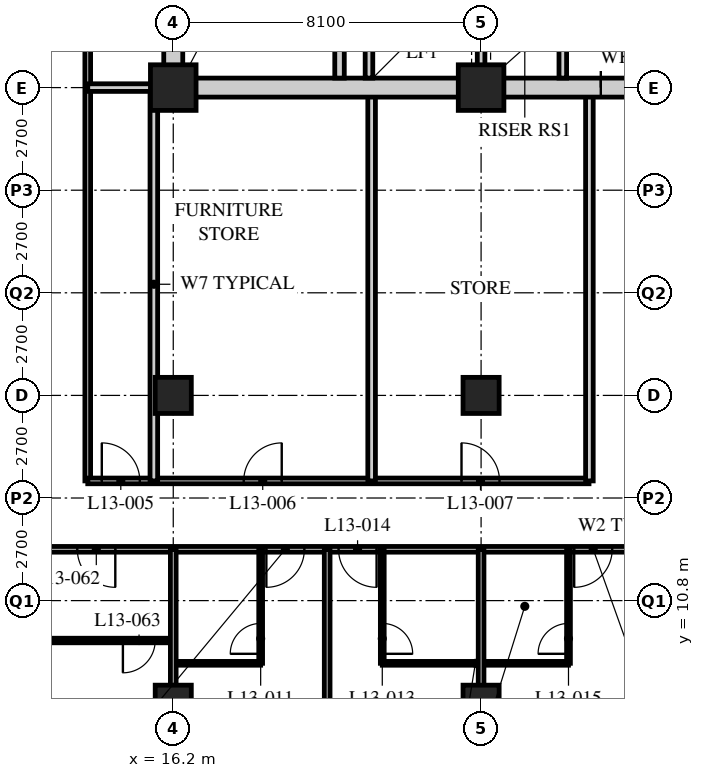
"""IFC4 building model, lengths in metres.
Left out: names, types, materials, properties, quantities, classifications, styles, units other than length and angle.
Written with IfcOpenShell. Run it as: python <this file> out.ifc"""

import sys

from ifc_helpers import new_model, si_unit, direction, frame, frame_2d, origin, origin_2d, place, context, subcontext, project, spatial, rectangle, hollow_rectangle, extrude, element, fill, save


model = new_model("IFC4")
c1 = context("Model", 3, precision=1e-05, world=origin(), true_north=direction((0.0, 1.0)))
c2 = subcontext(c1, "Body", "Model", "MODEL_VIEW")
j1 = project(units=[si_unit("LENGTHUNIT", "METRE"), si_unit("PLANEANGLEUNIT", "RADIAN")], contexts=[c1])
p1 = place(None, origin())
s1 = spatial("IfcSite", under=j1, at=p1, CompositionType="ELEMENT")
p2 = place(p1, origin())
s2 = spatial("IfcBuilding", under=s1, at=p2, CompositionType="ELEMENT")
p3 = place(p2, frame((0.0, 0.0, 56.8)))
s3 = spatial("IfcBuildingStorey", under=s2, at=p3, CompositionType="ELEMENT", Elevation=56.8)
for number, where, z_axis, x_axis in (
    (1, (16.2, 8.1, 0.0), (0.0, 0.0, 1.0), (1.0, 0.0, 0.0)),
    (2, (16.2, 16.2, 0.0), (0.0, 0.0, 1.0), (1.0, 0.0, 0.0)),
):
    element("IfcColumn", number, at=place(p3, frame(where, z_axis=z_axis, x_axis=x_axis)), inside=s3, PredefinedType="COLUMN", context=c2, shape_type="SweptSolid", body=[
        extrude(hollow_rectangle(XDim=0.95, YDim=0.95, WallThickness=0.095, at=origin_2d()), origin(), (0.0, 0.0, 1.0), 3.4),
    ])
p4 = place(p3, frame((16.2, 24.3, 0.0), z_axis=(0.0, 0.0, 1.0), x_axis=(1.0, 0.0, 0.0)))
e3 = element("IfcColumn", 3, at=p4, inside=s3, PredefinedType="COLUMN", context=c2, shape_type="SweptSolid", body=[
    extrude(hollow_rectangle(XDim=1.2, YDim=1.2, WallThickness=0.12, at=origin_2d()), origin(), (0.0, 0.0, 1.0), 3.4),
])
for number, where, z_axis, x_axis in (
    (4, (24.3, 8.1, 0.0), (0.0, 0.0, 1.0), (1.0, 0.0, 0.0)),
    (5, (24.3, 16.2, 0.0), (0.0, 0.0, 1.0), (1.0, 0.0, 0.0)),
):
    element("IfcColumn", number, at=place(p3, frame(where, z_axis=z_axis, x_axis=x_axis)), inside=s3, PredefinedType="COLUMN", context=c2, shape_type="SweptSolid", body=[
        extrude(hollow_rectangle(XDim=0.95, YDim=0.95, WallThickness=0.095, at=origin_2d()), origin(), (0.0, 0.0, 1.0), 3.4),
    ])
p5 = place(p3, frame((24.3, 24.3, 0.0), z_axis=(0.0, 0.0, 1.0), x_axis=(1.0, 0.0, 0.0)))
e6 = element("IfcColumn", 6, at=p5, inside=s3, PredefinedType="COLUMN", context=c2, shape_type="SweptSolid", body=[
    extrude(hollow_rectangle(XDim=1.2, YDim=1.2, WallThickness=0.12, at=origin_2d()), origin(), (0.0, 0.0, 1.0), 3.4),
])
p6 = place(p3, frame((12.15, 12.15, 0.0), z_axis=(0.0, 0.0, 1.0), x_axis=(1.0, 0.0, 0.0)))
e7 = element("IfcWall", 7, at=p6, inside=s3, PredefinedType="PARTITIONING", context=c2, shape_type="SweptSolid", body=[
    extrude(rectangle(XDim=32.4, YDim=0.15, at=frame_2d((16.2, 0.0))), origin(), (0.0, 0.0, 1.0), 3.19),
])
p7 = place(p6, frame((6.5, 0.0, 0.0)))
e8 = element("IfcOpeningElement", 8, at=p7, cuts=e7, PredefinedType="OPENING", context=c2, shape_type="SweptSolid", body=[
    extrude(rectangle(XDim=1.0, YDim=2.1, at=frame_2d((0.5, 1.05))), frame((0.0, 0.085, 0.0), z_axis=(0.0, -1.0, 0.0), x_axis=(1.0, 0.0, 0.0)), (0.0, 0.0, 1.0), 0.17),
])
p8 = place(p6, frame((8.4, 0.0, 0.0)))
e9 = element("IfcOpeningElement", 9, at=p8, cuts=e7, PredefinedType="OPENING", context=c2, shape_type="SweptSolid", body=[
    extrude(rectangle(XDim=1.0, YDim=2.1, at=frame_2d((0.5, 1.05))), frame((0.0, 0.085, 0.0), z_axis=(0.0, -1.0, 0.0), x_axis=(1.0, 0.0, 0.0)), (0.0, 0.0, 1.0), 0.17),
])
p9 = place(p6, frame((14.6, 0.0, 0.0)))
e10 = element("IfcOpeningElement", 10, at=p9, cuts=e7, PredefinedType="OPENING", context=c2, shape_type="SweptSolid", body=[
    extrude(rectangle(XDim=1.0, YDim=2.1, at=frame_2d((0.5, 1.05))), frame((0.0, 0.085, 0.0), z_axis=(0.0, -1.0, 0.0), x_axis=(1.0, 0.0, 0.0)), (0.0, 0.0, 1.0), 0.17),
])
p10 = place(p6, frame((18.65, 0.0, 0.0)))
e11 = element("IfcOpeningElement", 11, at=p10, cuts=e7, PredefinedType="OPENING", context=c2, shape_type="SweptSolid", body=[
    extrude(rectangle(XDim=1.0, YDim=2.1, at=frame_2d((0.5, 1.05))), frame((0.0, 0.085, 0.0), z_axis=(0.0, -1.0, 0.0), x_axis=(1.0, 0.0, 0.0)), (0.0, 0.0, 1.0), 0.17),
])
p11 = place(p6, frame((20.55, 0.0, 0.0)))
e12 = element("IfcOpeningElement", 12, at=p11, cuts=e7, PredefinedType="OPENING", context=c2, shape_type="SweptSolid", body=[
    extrude(rectangle(XDim=1.0, YDim=2.1, at=frame_2d((0.5, 1.05))), frame((0.0, 0.085, 0.0), z_axis=(0.0, -1.0, 0.0), x_axis=(1.0, 0.0, 0.0)), (0.0, 0.0, 1.0), 0.17),
])
p12 = place(p6, frame((26.75, 0.0, 0.0)))
e13 = element("IfcOpeningElement", 13, at=p12, cuts=e7, PredefinedType="OPENING", context=c2, shape_type="SweptSolid", body=[
    extrude(rectangle(XDim=1.0, YDim=2.1, at=frame_2d((0.5, 1.05))), frame((0.0, 0.085, 0.0), z_axis=(0.0, -1.0, 0.0), x_axis=(1.0, 0.0, 0.0)), (0.0, 0.0, 1.0), 0.17),
])
p13 = place(p6, frame((1.525, 0.0, 0.0)))
e14 = element("IfcOpeningElement", 14, at=p13, cuts=e7, PredefinedType="OPENING", context=c2, shape_type="SweptSolid", body=[
    extrude(rectangle(XDim=1.0, YDim=2.1, at=frame_2d((0.5, 1.05))), frame((0.0, 0.085, 0.0), z_axis=(0.0, -1.0, 0.0), x_axis=(1.0, 0.0, 0.0)), (0.0, 0.0, 1.0), 0.17),
])
p14 = place(p6, frame((29.875, 0.0, 0.0)))
e15 = element("IfcOpeningElement", 15, at=p14, cuts=e7, PredefinedType="OPENING", context=c2, shape_type="SweptSolid", body=[
    extrude(rectangle(XDim=1.0, YDim=2.1, at=frame_2d((0.5, 1.05))), frame((0.0, 0.085, 0.0), z_axis=(0.0, -1.0, 0.0), x_axis=(1.0, 0.0, 0.0)), (0.0, 0.0, 1.0), 0.17),
])
p15 = place(p3, frame((13.95, 40.5, 0.0), z_axis=(0.0, 0.0, 1.0), x_axis=(0.0, -1.0, 0.0)))
e16 = element("IfcWall", 16, at=p15, inside=s3, PredefinedType="PARTITIONING", context=c2, shape_type="SweptSolid", body=[
    extrude(rectangle(XDim=26.55, YDim=0.15, at=frame_2d((13.275, 0.0))), origin(), (0.0, 0.0, 1.0), 3.19),
])
p16 = place(p15, frame((11.65, 0.0, 0.0)))
e17 = element("IfcOpeningElement", 17, at=p16, cuts=e16, PredefinedType="OPENING", context=c2, shape_type="SweptSolid", body=[
    extrude(rectangle(XDim=1.0, YDim=2.1, at=frame_2d((0.5, 1.05))), frame((0.0, 0.085, 0.0), z_axis=(0.0, -1.0, 0.0), x_axis=(1.0, 0.0, 0.0)), (0.0, 0.0, 1.0), 0.17),
])
p17 = place(p15, frame((3.55, 0.0, 0.0)))
e18 = element("IfcOpeningElement", 18, at=p17, cuts=e16, PredefinedType="OPENING", context=c2, shape_type="SweptSolid", body=[
    extrude(rectangle(XDim=1.0, YDim=2.1, at=frame_2d((0.5, 1.05))), frame((0.0, 0.085, 0.0), z_axis=(0.0, -1.0, 0.0), x_axis=(1.0, 0.0, 0.0)), (0.0, 0.0, 1.0), 0.17),
])
p18 = place(p3, frame((13.95, 13.95, 0.0), z_axis=(0.0, 0.0, 1.0), x_axis=(1.0, 0.0, 0.0)))
e19 = element("IfcWall", 19, at=p18, inside=s3, PredefinedType="PARTITIONING", context=c2, shape_type="SweptSolid", body=[
    extrude(rectangle(XDim=13.19, YDim=0.15, at=frame_2d((6.595, 0.0))), origin(), (0.0, 0.0, 1.0), 3.19),
])
p19 = place(p18, frame((0.37, 0.0, 0.0)))
e20 = element("IfcOpeningElement", 20, at=p19, cuts=e19, PredefinedType="OPENING", context=c2, shape_type="SweptSolid", body=[
    extrude(rectangle(XDim=1.0, YDim=2.1, at=frame_2d((0.5, 1.05))), frame((0.0, 0.085, 0.0), z_axis=(0.0, -1.0, 0.0), x_axis=(1.0, 0.0, 0.0)), (0.0, 0.0, 1.0), 0.17),
])
p20 = place(p18, frame((4.104, 0.0, 0.0)))
e21 = element("IfcOpeningElement", 21, at=p20, cuts=e19, PredefinedType="OPENING", context=c2, shape_type="SweptSolid", body=[
    extrude(rectangle(XDim=1.0, YDim=2.1, at=frame_2d((0.5, 1.05))), frame((0.0, 0.085, 0.0), z_axis=(0.0, -1.0, 0.0), x_axis=(1.0, 0.0, 0.0)), (0.0, 0.0, 1.0), 0.17),
])
p21 = place(p18, frame((9.835, 0.0, 0.0)))
e22 = element("IfcOpeningElement", 22, at=p21, cuts=e19, PredefinedType="OPENING", context=c2, shape_type="SweptSolid", body=[
    extrude(rectangle(XDim=1.0, YDim=2.1, at=frame_2d((0.5, 1.05))), frame((0.0, 0.085, 0.0), z_axis=(0.0, -1.0, 0.0), x_axis=(1.0, 0.0, 0.0)), (0.0, 0.0, 1.0), 0.17),
])
for number, where, z_axis, x_axis in (
    (23, (15.689, 13.95, 0.0), (0.0, 0.0, 1.0), (0.0, 1.0, 0.0)),
    (24, (21.42, 13.95, 0.0), (0.0, 0.0, 1.0), (0.0, 1.0, 0.0)),
    (25, (27.15, 13.95, 0.0), (0.0, 0.0, 1.0), (0.0, 1.0, 0.0)),
):
    element("IfcWall", number, at=place(p3, frame(where, z_axis=z_axis, x_axis=x_axis)), inside=s3, PredefinedType="SOLIDWALL", context=c2, shape_type="SweptSolid", body=[
        extrude(rectangle(XDim=10.35, YDim=0.2, at=frame_2d((5.175, 0.0))), origin(), (0.0, 0.0, 1.0), 3.19),
    ])
p22 = place(p3, frame((13.95, 24.3, 0.0), z_axis=(0.0, 0.0, 1.0), x_axis=(1.0, 0.0, 0.0)))
e26 = element("IfcWall", 26, at=p22, inside=s3, PredefinedType="SOLIDWALL", context=c2, shape_type="SweptSolid", body=[
    extrude(rectangle(XDim=2.25, YDim=0.2, at=frame_2d((1.125, 0.0))), origin(), (0.0, 0.0, 1.0), 2.578),
])
p23 = place(p3, frame((16.2, 9.15, 0.0), z_axis=(0.0, 0.0, 1.0), x_axis=(1.0, 0.0, 0.0)))
e27 = element("IfcWall", 27, at=p23, inside=s3, PredefinedType="PARTITIONING", context=c2, shape_type="SweptSolid", body=[
    extrude(rectangle(XDim=2.3, YDim=0.1, at=frame_2d((1.15, 0.0))), origin(), (0.0, 0.0, 1.0), 3.19),
])
p24 = place(p3, frame((18.5, 12.15, 0.0), z_axis=(0.0, 0.0, 1.0), x_axis=(0.0, -1.0, 0.0)))
e28 = element("IfcWall", 28, at=p24, inside=s3, PredefinedType="PARTITIONING", context=c2, shape_type="SweptSolid", body=[
    extrude(rectangle(XDim=3.0, YDim=0.1, at=frame_2d((1.5, 0.0))), origin(), (0.0, 0.0, 1.0), 3.19),
])
p25 = place(p24, frame((1.95, 0.0, 0.0)))
e29 = element("IfcOpeningElement", 29, at=p25, cuts=e28, PredefinedType="OPENING", context=c2, shape_type="SweptSolid", body=[
    extrude(rectangle(XDim=0.8, YDim=2.1, at=frame_2d((0.4, 1.05))), frame((0.0, 0.06, 0.0), z_axis=(0.0, -1.0, 0.0), x_axis=(1.0, 0.0, 0.0)), (0.0, 0.0, 1.0), 0.12),
])
p26 = place(p3, frame((20.25, 12.15, 0.0), z_axis=(0.0, 0.0, 1.0), x_axis=(0.0, -1.0, 0.0)))
e30 = element("IfcWall", 30, at=p26, inside=s3, PredefinedType="PARTITIONING", context=c2, shape_type="SweptSolid", body=[
    extrude(rectangle(XDim=11.85, YDim=0.15, at=frame_2d((5.925, 0.0))), origin(), (0.0, 0.0, 1.0), 3.19),
])
p27 = place(p3, frame((21.7, 9.15, 0.0), z_axis=(0.0, 0.0, 1.0), x_axis=(1.0, 0.0, 0.0)))
e31 = element("IfcWall", 31, at=p27, inside=s3, PredefinedType="PARTITIONING", context=c2, shape_type="SweptSolid", body=[
    extrude(rectangle(XDim=4.9, YDim=0.1, at=frame_2d((2.45, 0.0))), origin(), (0.0, 0.0, 1.0), 3.19),
])
p28 = place(p3, frame((21.7, 12.15, 0.0), z_axis=(0.0, 0.0, 1.0), x_axis=(0.0, -1.0, 0.0)))
e32 = element("IfcWall", 32, at=p28, inside=s3, PredefinedType="PARTITIONING", context=c2, shape_type="SweptSolid", body=[
    extrude(rectangle(XDim=3.0, YDim=0.1, at=frame_2d((1.5, 0.0))), origin(), (0.0, 0.0, 1.0), 3.19),
])
p29 = place(p28, frame((1.95, 0.0, 0.0)))
e33 = element("IfcOpeningElement", 33, at=p29, cuts=e32, PredefinedType="OPENING", context=c2, shape_type="SweptSolid", body=[
    extrude(rectangle(XDim=0.8, YDim=2.1, at=frame_2d((0.4, 1.05))), frame((0.0, 0.06, 0.0), z_axis=(0.0, -1.0, 0.0), x_axis=(1.0, 0.0, 0.0)), (0.0, 0.0, 1.0), 0.12),
])
p30 = place(p3, frame((24.3, 12.15, 0.0), z_axis=(0.0, 0.0, 1.0), x_axis=(0.0, -1.0, 0.0)))
e34 = element("IfcWall", 34, at=p30, inside=s3, PredefinedType="PARTITIONING", context=c2, shape_type="SweptSolid", body=[
    extrude(rectangle(XDim=11.85, YDim=0.15, at=frame_2d((5.925, 0.0))), origin(), (0.0, 0.0, 1.0), 2.578),
])
p31 = place(p3, frame((26.6, 12.15, 0.0), z_axis=(0.0, 0.0, 1.0), x_axis=(0.0, -1.0, 0.0)))
e35 = element("IfcWall", 35, at=p31, inside=s3, PredefinedType="PARTITIONING", context=c2, shape_type="SweptSolid", body=[
    extrude(rectangle(XDim=3.0, YDim=0.1, at=frame_2d((1.5, 0.0))), origin(), (0.0, 0.0, 1.0), 3.19),
])
p32 = place(p31, frame((1.95, 0.0, 0.0)))
e36 = element("IfcOpeningElement", 36, at=p32, cuts=e35, PredefinedType="OPENING", context=c2, shape_type="SweptSolid", body=[
    extrude(rectangle(XDim=0.8, YDim=2.1, at=frame_2d((0.4, 1.05))), frame((0.0, 0.06, 0.0), z_axis=(0.0, -1.0, 0.0), x_axis=(1.0, 0.0, 0.0)), (0.0, 0.0, 1.0), 0.12),
])
p33 = place(p3, frame((8.15, 9.75, 0.0), z_axis=(0.0, 0.0, 1.0), x_axis=(1.0, 0.0, 0.0)))
e37 = element("IfcWall", 37, at=p33, inside=s3, PredefinedType="PARTITIONING", context=c2, shape_type="SweptSolid", body=[
    extrude(rectangle(XDim=8.05, YDim=0.12, at=frame_2d((4.025, 0.0))), origin(), (0.0, 0.0, 1.0), 3.19),
])
p34 = place(p33, frame((6.725, 0.0, 0.0)))
e38 = element("IfcOpeningElement", 38, at=p34, cuts=e37, PredefinedType="OPENING", context=c2, shape_type="SweptSolid", body=[
    extrude(rectangle(XDim=0.85, YDim=2.1, at=frame_2d((0.425, 1.05))), frame((0.0, 0.07, 0.0), z_axis=(0.0, -1.0, 0.0), x_axis=(1.0, 0.0, 0.0)), (0.0, 0.0, 1.0), 0.14),
])
p35 = place(p33, frame((2.875, 0.0, 0.0)))
e39 = element("IfcOpeningElement", 39, at=p35, cuts=e37, PredefinedType="OPENING", context=c2, shape_type="SweptSolid", body=[
    extrude(rectangle(XDim=0.85, YDim=2.1, at=frame_2d((0.425, 1.05))), frame((0.0, 0.07, 0.0), z_axis=(0.0, -1.0, 0.0), x_axis=(1.0, 0.0, 0.0)), (0.0, 0.0, 1.0), 0.14),
])
p36 = place(p3, frame((16.2, 12.15, 0.0), z_axis=(0.0, 0.0, 1.0), x_axis=(0.0, -1.0, 0.0)))
e40 = element("IfcWall", 40, at=p36, inside=s3, PredefinedType="PARTITIONING", context=c2, shape_type="SweptSolid", body=[
    extrude(rectangle(XDim=11.85, YDim=0.15, at=frame_2d((5.925, 0.0))), origin(), (0.0, 0.0, 1.0), 2.578),
])
p37 = place(p3, frame((15.95, 24.3, 0.0), z_axis=(0.0, 0.0, 1.0), x_axis=(1.0, 0.0, 0.0)))
e41 = element("IfcWall", 41, at=p37, inside=s3, PredefinedType="SOLIDWALL", context=c2, shape_type="SweptSolid", body=[
    extrude(rectangle(XDim=24.8, YDim=0.5, at=frame_2d((12.4, 0.0))), origin(), (0.0, 0.0, 1.0), 2.54),
])
p38 = place(p37, frame((11.5, 0.0, 0.0)))
e42 = element("IfcOpeningElement", 42, at=p38, cuts=e41, PredefinedType="OPENING", context=c2, shape_type="SweptSolid", body=[
    extrude(rectangle(XDim=1.8, YDim=2.4, at=frame_2d((0.9, 1.2))), frame((0.0, 0.26, 0.0), z_axis=(0.0, -1.0, 0.0), x_axis=(1.0, 0.0, 0.0)), (0.0, 0.0, 1.0), 0.52),
])
p39 = place(p3, frame((16.2, 24.55, 0.0), z_axis=(0.0, 0.0, 1.0), x_axis=(0.0, 1.0, 0.0)))
e43 = element("IfcWall", 43, at=p39, inside=s3, PredefinedType="SOLIDWALL", context=c2, shape_type="SweptSolid", body=[
    extrude(rectangle(XDim=15.7, YDim=0.5, at=frame_2d((7.85, 0.0))), origin(), (0.0, 0.0, 1.0), 2.578),
])
p40 = place(p3, frame((24.3, 24.55, 0.0), z_axis=(0.0, 0.0, 1.0), x_axis=(0.0, 1.0, 0.0)))
e44 = element("IfcWall", 44, at=p40, inside=s3, PredefinedType="SOLIDWALL", context=c2, shape_type="SweptSolid", body=[
    extrude(rectangle(XDim=7.75, YDim=0.2, at=frame_2d((3.875, 0.0))), origin(), (0.0, 0.0, 1.0), 2.578),
])
p41 = place(p40, frame((4.6, 0.0, 0.0)))
e45 = element("IfcOpeningElement", 45, at=p41, cuts=e44, PredefinedType="OPENING", context=c2, shape_type="SweptSolid", body=[
    extrude(rectangle(XDim=1.2, YDim=2.1, at=frame_2d((0.6, 1.05))), frame((0.0, 0.11, 0.0), z_axis=(0.0, -1.0, 0.0), x_axis=(1.0, 0.0, 0.0)), (0.0, 0.0, 1.0), 0.22),
])
p42 = place(p3, frame((20.575, 24.55, 0.0), z_axis=(0.0, 0.0, 1.0), x_axis=(0.0, 1.0, 0.0)))
e46 = element("IfcWall", 46, at=p42, inside=s3, PredefinedType="SOLIDWALL", context=c2, shape_type="SweptSolid", body=[
    extrude(rectangle(XDim=7.75, YDim=0.25, at=frame_2d((3.875, 0.0))), origin(), (0.0, 0.0, 1.0), 3.19),
])
p43 = place(p42, frame((6.2, 0.0, 0.0)))
e47 = element("IfcOpeningElement", 47, at=p43, cuts=e46, PredefinedType="OPENING", context=c2, shape_type="SweptSolid", body=[
    extrude(rectangle(XDim=1.2, YDim=2.1, at=frame_2d((0.6, 1.05))), frame((0.0, 0.135, 0.0), z_axis=(0.0, -1.0, 0.0), x_axis=(1.0, 0.0, 0.0)), (0.0, 0.0, 1.0), 0.27),
])
p44 = place(p3, frame((21.35, 24.55, 0.0), z_axis=(0.0, 0.0, 1.0), x_axis=(0.0, 1.0, 0.0)))
e48 = element("IfcWall", 48, at=p44, inside=s3, PredefinedType="SOLIDWALL", context=c2, shape_type="SweptSolid", body=[
    extrude(rectangle(XDim=2.6, YDim=0.2, at=frame_2d((1.3, 0.0))), origin(), (0.0, 0.0, 1.0), 3.19),
])
p45 = place(p3, frame((26.45, 24.55, 0.0), z_axis=(0.0, 0.0, 1.0), x_axis=(0.0, 1.0, 0.0)))
e49 = element("IfcWall", 49, at=p45, inside=s3, PredefinedType="SOLIDWALL", context=c2, shape_type="SweptSolid", body=[
    extrude(rectangle(XDim=1.6, YDim=0.2, at=frame_2d((0.8, 0.0))), origin(), (0.0, 0.0, 1.0), 3.19),
])
p46 = place(p19, origin())
e50 = element("IfcDoor", 50, at=p46, inside=s3, OperationType="SINGLE_SWING_LEFT", PredefinedType="DOOR", context=c2, shape_type="SweptSolid", body=[
    extrude(rectangle(XDim=1.0, YDim=2.1, at=frame_2d((0.5, 1.05))), frame((0.0, 0.025, 0.0), z_axis=(0.0, -1.0, 0.0), x_axis=(1.0, 0.0, 0.0)), (0.0, 0.0, 1.0), 0.05),
])
fill(e20, e50)
p47 = place(p20, origin())
e51 = element("IfcDoor", 51, at=p47, inside=s3, OperationType="SINGLE_SWING_RIGHT", PredefinedType="DOOR", context=c2, shape_type="SweptSolid", body=[
    extrude(rectangle(XDim=1.0, YDim=2.1, at=frame_2d((0.5, 1.05))), frame((0.0, 0.025, 0.0), z_axis=(0.0, -1.0, 0.0), x_axis=(1.0, 0.0, 0.0)), (0.0, 0.0, 1.0), 0.05),
])
fill(e21, e51)
p48 = place(p21, origin())
e52 = element("IfcDoor", 52, at=p48, inside=s3, OperationType="SINGLE_SWING_LEFT", PredefinedType="DOOR", context=c2, shape_type="SweptSolid", body=[
    extrude(rectangle(XDim=1.0, YDim=2.1, at=frame_2d((0.5, 1.05))), frame((0.0, 0.025, 0.0), z_axis=(0.0, -1.0, 0.0), x_axis=(1.0, 0.0, 0.0)), (0.0, 0.0, 1.0), 0.05),
])
fill(e22, e52)
p49 = place(p25, origin())
e53 = element("IfcDoor", 53, at=p49, inside=s3, OperationType="SINGLE_SWING_LEFT", PredefinedType="DOOR", context=c2, shape_type="SweptSolid", body=[
    extrude(rectangle(XDim=0.8, YDim=2.1, at=frame_2d((0.4, 1.05))), frame((0.0, 0.025, 0.0), z_axis=(0.0, -1.0, 0.0), x_axis=(1.0, 0.0, 0.0)), (0.0, 0.0, 1.0), 0.05),
])
fill(e29, e53)
p50 = place(p7, origin())
e54 = element("IfcDoor", 54, at=p50, inside=s3, OperationType="SINGLE_SWING_RIGHT", PredefinedType="DOOR", context=c2, shape_type="SweptSolid", body=[
    extrude(rectangle(XDim=1.0, YDim=2.1, at=frame_2d((0.5, 1.05))), frame((0.0, 0.025, 0.0), z_axis=(0.0, -1.0, 0.0), x_axis=(1.0, 0.0, 0.0)), (0.0, 0.0, 1.0), 0.05),
])
fill(e8, e54)
p51 = place(p29, origin())
e55 = element("IfcDoor", 55, at=p51, inside=s3, OperationType="SINGLE_SWING_RIGHT", PredefinedType="DOOR", context=c2, shape_type="SweptSolid", body=[
    extrude(rectangle(XDim=0.8, YDim=2.1, at=frame_2d((0.4, 1.05))), frame((0.0, 0.025, 0.0), z_axis=(0.0, -1.0, 0.0), x_axis=(1.0, 0.0, 0.0)), (0.0, 0.0, 1.0), 0.05),
])
fill(e33, e55)
p52 = place(p8, origin())
e56 = element("IfcDoor", 56, at=p52, inside=s3, OperationType="SINGLE_SWING_LEFT", PredefinedType="DOOR", context=c2, shape_type="SweptSolid", body=[
    extrude(rectangle(XDim=1.0, YDim=2.1, at=frame_2d((0.5, 1.05))), frame((0.0, 0.025, 0.0), z_axis=(0.0, -1.0, 0.0), x_axis=(1.0, 0.0, 0.0)), (0.0, 0.0, 1.0), 0.05),
])
fill(e9, e56)
p53 = place(p32, origin())
e57 = element("IfcDoor", 57, at=p53, inside=s3, OperationType="SINGLE_SWING_LEFT", PredefinedType="DOOR", context=c2, shape_type="SweptSolid", body=[
    extrude(rectangle(XDim=0.8, YDim=2.1, at=frame_2d((0.4, 1.05))), frame((0.0, 0.025, 0.0), z_axis=(0.0, -1.0, 0.0), x_axis=(1.0, 0.0, 0.0)), (0.0, 0.0, 1.0), 0.05),
])
fill(e36, e57)
p54 = place(p9, origin())
e58 = element("IfcDoor", 58, at=p54, inside=s3, OperationType="SINGLE_SWING_RIGHT", PredefinedType="DOOR", context=c2, shape_type="SweptSolid", body=[
    extrude(rectangle(XDim=1.0, YDim=2.1, at=frame_2d((0.5, 1.05))), frame((0.0, 0.025, 0.0), z_axis=(0.0, -1.0, 0.0), x_axis=(1.0, 0.0, 0.0)), (0.0, 0.0, 1.0), 0.05),
])
fill(e10, e58)
p55 = place(p13, origin())
e59 = element("IfcDoor", 59, at=p55, inside=s3, OperationType="SINGLE_SWING_LEFT", PredefinedType="DOOR", context=c2, shape_type="SweptSolid", body=[
    extrude(rectangle(XDim=1.0, YDim=2.1, at=frame_2d((0.5, 1.05))), frame((0.0, 0.025, 0.0), z_axis=(0.0, -1.0, 0.0), x_axis=(1.0, 0.0, 0.0)), (0.0, 0.0, 1.0), 0.05),
])
fill(e14, e59)
p56 = place(p34, origin())
e60 = element("IfcDoor", 60, at=p56, inside=s3, OperationType="SINGLE_SWING_RIGHT", PredefinedType="DOOR", context=c2, shape_type="SweptSolid", body=[
    extrude(rectangle(XDim=0.85, YDim=2.1, at=frame_2d((0.425, 1.05))), frame((0.0, 0.025, 0.0), z_axis=(0.0, -1.0, 0.0), x_axis=(1.0, 0.0, 0.0)), (0.0, 0.0, 1.0), 0.05),
])
fill(e38, e60)
p57 = place(p38, origin())
e61 = element("IfcDoor", 61, at=p57, inside=s3, OperationType="DOUBLE_DOOR_SINGLE_SWING", PredefinedType="DOOR", context=c2, shape_type="SweptSolid", body=[
    extrude(rectangle(XDim=1.8, YDim=2.4, at=frame_2d((0.9, 1.2))), frame((0.0, 0.025, 0.0), z_axis=(0.0, -1.0, 0.0), x_axis=(1.0, 0.0, 0.0)), (0.0, 0.0, 1.0), 0.05),
])
fill(e42, e61)
save(model, sys.argv[1])
